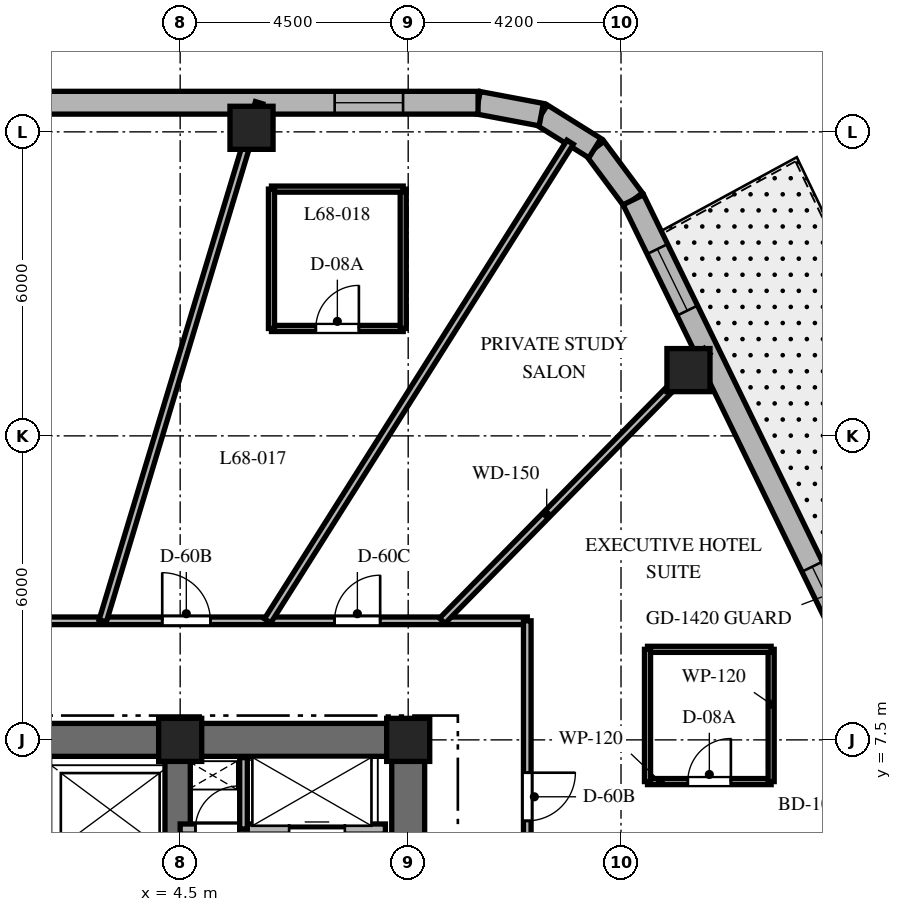
"""IFC4 building model, lengths in metres.
Left out: names, types, materials, properties, quantities, classifications, styles, units other than length and angle.
Written with IfcOpenShell. Run it as: python <this file> out.ifc"""

import sys

from ifc_helpers import new_model, si_unit, direction, frame, frame_2d, origin, origin_2d, place, context, subcontext, project, spatial, rectangle, extrude, element, fill, save


model = new_model("IFC4")
c1 = context("Model", 3, precision=1e-05, world=origin(), true_north=direction((0.0, 1.0)))
c2 = subcontext(c1, "Body", "Model", "MODEL_VIEW")
j1 = project(units=[si_unit("LENGTHUNIT", "METRE"), si_unit("PLANEANGLEUNIT", "RADIAN")], contexts=[c1])
p1 = place(None, origin())
s1 = spatial("IfcSite", under=j1, at=p1, CompositionType="ELEMENT")
p2 = place(p1, origin())
s2 = spatial("IfcBuilding", under=s1, at=p2, CompositionType="ELEMENT")
p3 = place(p2, frame((0.0, 0.0, 273.0)))
s3 = spatial("IfcBuildingStorey", under=s2, at=p3, CompositionType="ELEMENT", Elevation=273.0)
p4 = place(p3, frame((1.85, 7.5, 0.0), z_axis=(0.0, 0.0, 1.0), x_axis=(1.0, 0.0, 0.0)))
e1 = element("IfcWall", 1, at=p4, inside=s3, PredefinedType="SHEAR", context=c2, shape_type="SweptSolid", body=[
    extrude(rectangle(XDim=7.475, YDim=0.65, at=frame_2d((3.737, 0.0))), origin(), (0.0, 0.0, 1.0), 3.9),
])
p5 = place(p3, frame((9.0, -7.175, 0.0), z_axis=(0.0, 0.0, 1.0), x_axis=(0.0, 1.0, 0.0)))
e2 = element("IfcWall", 2, at=p5, inside=s3, PredefinedType="SHEAR", context=c2, shape_type="SweptSolid", body=[
    extrude(rectangle(XDim=14.35, YDim=0.65, at=frame_2d((7.175, 0.0))), origin(), (0.0, 0.0, 1.0), 3.9),
])
p6 = place(p5, frame((10.3, 0.0, 0.0)))
e3 = element("IfcOpeningElement", 3, at=p6, cuts=e2, PredefinedType="OPENING", context=c2, shape_type="SweptSolid", body=[
    extrude(rectangle(XDim=1.05, YDim=2.15, at=frame_2d((0.525, 1.075))), frame((0.0, 0.335, 0.0), z_axis=(0.0, -1.0, 0.0), x_axis=(1.0, 0.0, 0.0)), (0.0, 0.0, 1.0), 0.67),
])
p7 = place(p3, frame((4.45, 2.25, 0.0), z_axis=(0.0, 0.0, 1.0), x_axis=(0.0, 1.0, 0.0)))
e4 = element("IfcWall", 4, at=p7, inside=s3, PredefinedType="SHEAR", context=c2, shape_type="SweptSolid", body=[
    extrude(rectangle(XDim=4.925, YDim=0.5, at=frame_2d((2.462, 0.0))), origin(), (0.0, 0.0, 1.0), 3.9),
])
for number, where, z_axis, x_axis in (
    (5, (9.0, 7.5, 0.0), (0.0, 0.0, 1.0), (1.0, 0.0, 0.0)),
    (6, (4.5, 7.5, 0.0), (0.0, 0.0, 1.0), (1.0, 0.0, 0.0)),
    (7, (14.531, 14.798, 0.0), (0.0, 0.0, 1.0), (1.0, 0.0, 0.0)),
    (8, (5.908, 19.58, 0.0), (0.0, 0.0, 1.0), (1.0, 0.0, 0.0)),
):
    element("IfcColumn", number, at=place(p3, frame(where, z_axis=z_axis, x_axis=x_axis)), inside=s3, PredefinedType="COLUMN", context=c2, shape_type="SweptSolid", body=[
        extrude(rectangle(XDim=0.85, YDim=0.85, at=origin_2d()), origin(), (0.0, 0.0, 1.0), 3.9),
    ])
p8 = place(p3, frame((13.443, 18.16, 0.0), z_axis=(0.0, 0.0, 1.0), x_axis=(-0.597042425808, 0.802209661987, 0.0)))
e9 = element("IfcWall", 9, at=p8, inside=s3, PredefinedType="SOLIDWALL", context=c2, shape_type="SweptSolid", body=[
    extrude(rectangle(XDim=1.27, YDim=0.45, at=frame_2d((0.635, 0.0))), origin(), (0.0, 0.0, 1.0), 3.6),
])
p9 = place(p3, frame((12.685, 19.178, 0.0), z_axis=(0.0, 0.0, 1.0), x_axis=(-0.848031272749, 0.529946186362, 0.0)))
e10 = element("IfcWall", 10, at=p9, inside=s3, PredefinedType="SOLIDWALL", context=c2, shape_type="SweptSolid", body=[
    extrude(rectangle(XDim=1.248, YDim=0.45, at=frame_2d((0.624, 0.0))), origin(), (0.0, 0.0, 1.0), 3.6),
])
p10 = place(p3, frame((11.626, 19.84, 0.0), z_axis=(0.0, 0.0, 1.0), x_axis=(-0.982701956681, 0.185194126083, 0.0)))
e11 = element("IfcWall", 11, at=p10, inside=s3, PredefinedType="SOLIDWALL", context=c2, shape_type="SweptSolid", body=[
    extrude(rectangle(XDim=1.27, YDim=0.45, at=frame_2d((0.635, 0.0))), origin(), (0.0, 0.0, 1.0), 3.6),
])
p11 = place(p3, frame((21.138, 2.371, 0.0), z_axis=(0.0, 0.0, 1.0), x_axis=(-0.438128124058, 0.89891253574, 0.0)))
e12 = element("IfcWall", 12, at=p11, inside=s3, PredefinedType="SOLIDWALL", context=c2, shape_type="SweptSolid", body=[
    extrude(rectangle(XDim=17.565, YDim=0.45, at=frame_2d((8.782, 0.0))), origin(), (0.0, 0.0, 1.0), 3.6),
])
p12 = place(p11, frame((4.769, 0.0, 0.0)))
e13 = element("IfcOpeningElement", 13, at=p12, cuts=e12, PredefinedType="OPENING", context=c2, shape_type="SweptSolid", body=[
    extrude(rectangle(XDim=1.0, YDim=2.15, at=frame_2d((0.5, 1.075))), frame((0.0, 0.235, 0.0), z_axis=(0.0, -1.0, 0.0), x_axis=(1.0, 0.0, 0.0)), (0.0, 0.0, 1.0), 0.47),
])
p13 = place(p11, frame((8.158, 0.0, 0.8)))
e14 = element("IfcOpeningElement", 14, at=p13, cuts=e12, PredefinedType="OPENING", context=c2, shape_type="SweptSolid", body=[
    extrude(rectangle(XDim=1.35, YDim=1.75, at=frame_2d((0.675, 0.875))), frame((0.0, 0.235, 0.0), z_axis=(0.0, -1.0, 0.0), x_axis=(1.0, 0.0, 0.0)), (0.0, 0.0, 1.0), 0.47),
])
p14 = place(p11, frame((15.132, 0.0, 0.8)))
e15 = element("IfcOpeningElement", 15, at=p14, cuts=e12, PredefinedType="OPENING", context=c2, shape_type="SweptSolid", body=[
    extrude(rectangle(XDim=1.35, YDim=1.75, at=frame_2d((0.675, 0.875))), frame((0.0, 0.235, 0.0), z_axis=(0.0, -1.0, 0.0), x_axis=(1.0, 0.0, 0.0)), (0.0, 0.0, 1.0), 0.47),
])
p15 = place(p11, frame((1.133, 0.0, 0.8)))
e16 = element("IfcOpeningElement", 16, at=p15, cuts=e12, PredefinedType="OPENING", context=c2, shape_type="SweptSolid", body=[
    extrude(rectangle(XDim=1.35, YDim=1.75, at=frame_2d((0.675, 0.875))), frame((0.0, 0.235, 0.0), z_axis=(0.0, -1.0, 0.0), x_axis=(1.0, 0.0, 0.0)), (0.0, 0.0, 1.0), 0.47),
])
p16 = place(p3, frame((10.379, 20.075, 0.0), z_axis=(0.0, 0.0, 1.0), x_axis=(-1.0, 0.0, 0.0)))
e17 = element("IfcWall", 17, at=p16, inside=s3, PredefinedType="SOLIDWALL", context=c2, shape_type="SweptSolid", body=[
    extrude(rectangle(XDim=22.417, YDim=0.45, at=frame_2d((11.208, 0.0))), origin(), (0.0, 0.0, 1.0), 3.6),
])
p17 = place(p16, frame((1.48, 0.0, 0.8)))
e18 = element("IfcOpeningElement", 18, at=p17, cuts=e17, PredefinedType="OPENING", context=c2, shape_type="SweptSolid", body=[
    extrude(rectangle(XDim=1.35, YDim=1.75, at=frame_2d((0.675, 0.875))), frame((0.0, 0.235, 0.0), z_axis=(0.0, -1.0, 0.0), x_axis=(1.0, 0.0, 0.0)), (0.0, 0.0, 1.0), 0.47),
])
p18 = place(p16, frame((10.534, 0.0, 0.8)))
e19 = element("IfcOpeningElement", 19, at=p18, cuts=e17, PredefinedType="OPENING", context=c2, shape_type="SweptSolid", body=[
    extrude(rectangle(XDim=1.35, YDim=1.75, at=frame_2d((0.675, 0.875))), frame((0.0, 0.235, 0.0), z_axis=(0.0, -1.0, 0.0), x_axis=(1.0, 0.0, 0.0)), (0.0, 0.0, 1.0), 0.47),
])
p19 = place(p16, frame((19.587, 0.0, 0.8)))
e20 = element("IfcOpeningElement", 20, at=p19, cuts=e17, PredefinedType="OPENING", context=c2, shape_type="SweptSolid", body=[
    extrude(rectangle(XDim=1.35, YDim=1.75, at=frame_2d((0.675, 0.875))), frame((0.0, 0.235, 0.0), z_axis=(0.0, -1.0, 0.0), x_axis=(1.0, 0.0, 0.0)), (0.0, 0.0, 1.0), 0.47),
])
p20 = place(p3, frame((4.5, 5.74, 0.0), z_axis=(0.0, 0.0, 1.0), x_axis=(1.0, 0.0, 0.0)))
e21 = element("IfcWall", 21, at=p20, inside=s3, PredefinedType="PARTITIONING", context=c2, shape_type="SweptSolid", body=[
    extrude(rectangle(XDim=4.05, YDim=0.2, at=frame_2d((2.025, 0.0))), origin(), (0.0, 0.0, 1.0), 3.6),
])
p21 = place(p20, frame((0.3, 0.0, 0.0)))
e22 = element("IfcOpeningElement", 22, at=p21, cuts=e21, PredefinedType="OPENING", context=c2, shape_type="SweptSolid", body=[
    extrude(rectangle(XDim=0.85, YDim=2.03, at=frame_2d((0.425, 1.015))), frame((0.0, 0.11, 0.0), z_axis=(0.0, -1.0, 0.0), x_axis=(1.0, 0.0, 0.0)), (0.0, 0.0, 1.0), 0.22),
])
p22 = place(p20, frame((2.15, 0.0, 0.0)))
e23 = element("IfcOpeningElement", 23, at=p22, cuts=e21, PredefinedType="OPENING", context=c2, shape_type="SweptSolid", body=[
    extrude(rectangle(XDim=1.1, YDim=2.2, at=frame_2d((0.55, 1.1))), frame((0.0, 0.11, 0.0), z_axis=(0.0, -1.0, 0.0), x_axis=(1.0, 0.0, 0.0)), (0.0, 0.0, 1.0), 0.22),
])
p23 = place(p3, frame((5.75, 5.74, 0.0), z_axis=(0.0, 0.0, 1.0), x_axis=(0.0, 1.0, 0.0)))
e24 = element("IfcWall", 24, at=p23, inside=s3, PredefinedType="PARTITIONING", context=c2, shape_type="SweptSolid", body=[
    extrude(rectangle(XDim=1.41, YDim=0.15, at=frame_2d((0.705, 0.0))), origin(), (0.0, 0.0, 1.0), 3.6),
])
p24 = place(p3, frame((0.92, 9.85, 0.0), z_axis=(0.0, 0.0, 1.0), x_axis=(1.0, 0.0, 0.0)))
e25 = element("IfcWall", 25, at=p24, inside=s3, PredefinedType="PARTITIONING", context=c2, shape_type="SweptSolid", body=[
    extrude(rectangle(XDim=10.43, YDim=0.15, at=frame_2d((5.215, 0.0))), origin(), (0.0, 0.0, 1.0), 3.09),
])
p25 = place(p24, frame((6.627, 0.0, 0.0)))
e26 = element("IfcOpeningElement", 26, at=p25, cuts=e25, PredefinedType="OPENING", context=c2, shape_type="SweptSolid", body=[
    extrude(rectangle(XDim=0.9, YDim=2.03, at=frame_2d((0.45, 1.015))), frame((0.0, 0.085, 0.0), z_axis=(0.0, -1.0, 0.0), x_axis=(1.0, 0.0, 0.0)), (0.0, 0.0, 1.0), 0.17),
])
p26 = place(p24, frame((3.226, 0.0, 0.0)))
e27 = element("IfcOpeningElement", 27, at=p26, cuts=e25, PredefinedType="OPENING", context=c2, shape_type="SweptSolid", body=[
    extrude(rectangle(XDim=0.95, YDim=2.03, at=frame_2d((0.475, 1.015))), frame((0.0, 0.085, 0.0), z_axis=(0.0, -1.0, 0.0), x_axis=(1.0, 0.0, 0.0)), (0.0, 0.0, 1.0), 0.17),
])
p27 = place(p3, frame((11.35, 9.85, 0.0), z_axis=(0.0, 0.0, 1.0), x_axis=(0.0, -1.0, 0.0)))
e28 = element("IfcWall", 28, at=p27, inside=s3, PredefinedType="PARTITIONING", context=c2, shape_type="SweptSolid", body=[
    extrude(rectangle(XDim=12.4, YDim=0.15, at=frame_2d((6.2, 0.0))), origin(), (0.0, 0.0, 1.0), 3.09),
])
p28 = place(p27, frame((2.998, 0.0, 0.0)))
e29 = element("IfcOpeningElement", 29, at=p28, cuts=e28, PredefinedType="OPENING", context=c2, shape_type="SweptSolid", body=[
    extrude(rectangle(XDim=0.95, YDim=2.03, at=frame_2d((0.475, 1.015))), frame((0.0, 0.085, 0.0), z_axis=(0.0, -1.0, 0.0), x_axis=(1.0, 0.0, 0.0)), (0.0, 0.0, 1.0), 0.17),
])
p29 = place(p27, frame((8.835, 0.0, 0.0)))
e30 = element("IfcOpeningElement", 30, at=p29, cuts=e28, PredefinedType="OPENING", context=c2, shape_type="SweptSolid", body=[
    extrude(rectangle(XDim=0.95, YDim=2.03, at=frame_2d((0.475, 1.015))), frame((0.0, 0.085, 0.0), z_axis=(0.0, -1.0, 0.0), x_axis=(1.0, 0.0, 0.0)), (0.0, 0.0, 1.0), 0.17),
])
p30 = place(p3, frame((9.672, 9.85, 0.0), z_axis=(0.0, 0.0, 1.0), x_axis=(0.700629771301, 0.713524998558, 0.0)))
e31 = element("IfcWall", 31, at=p30, inside=s3, PredefinedType="PARTITIONING", context=c2, shape_type="SweptSolid", body=[
    extrude(rectangle(XDim=7.459, YDim=0.15, at=frame_2d((3.73, 0.0))), origin(), (0.0, 0.0, 1.0), 2.94),
])
p31 = place(p3, frame((6.226, 9.85, 0.0), z_axis=(0.0, 0.0, 1.0), x_axis=(0.53429711317, 0.845296749584, 0.0)))
e32 = element("IfcWall", 32, at=p31, inside=s3, PredefinedType="PARTITIONING", context=c2, shape_type="SweptSolid", body=[
    extrude(rectangle(XDim=11.174, YDim=0.15, at=frame_2d((5.587, 0.0))), origin(), (0.0, 0.0, 1.0), 2.94),
])
p32 = place(p3, frame((2.972, 9.85, 0.0), z_axis=(0.0, 0.0, 1.0), x_axis=(0.288872169679, 0.957367677324, 0.0)))
e33 = element("IfcWall", 33, at=p32, inside=s3, PredefinedType="PARTITIONING", context=c2, shape_type="SweptSolid", body=[
    extrude(rectangle(XDim=10.68, YDim=0.15, at=frame_2d((5.34, 0.0))), origin(), (0.0, 0.0, 1.0), 2.94),
])
p33 = place(p3, frame((13.723, 6.677, 0.0), z_axis=(0.0, 0.0, 1.0), x_axis=(1.0, 0.0, 0.0)))
e34 = element("IfcWall", 34, at=p33, inside=s3, PredefinedType="PARTITIONING", context=c2, shape_type="SweptSolid", body=[
    extrude(rectangle(XDim=2.44, YDim=0.12, at=frame_2d((1.22, 0.0))), origin(), (0.0, 0.0, 1.0), 3.126),
])
p34 = place(p33, frame((0.795, 0.0, 0.0)))
e35 = element("IfcOpeningElement", 35, at=p34, cuts=e34, PredefinedType="OPENING", context=c2, shape_type="SweptSolid", body=[
    extrude(rectangle(XDim=0.85, YDim=2.03, at=frame_2d((0.425, 1.015))), frame((0.0, 0.07, 0.0), z_axis=(0.0, -1.0, 0.0), x_axis=(1.0, 0.0, 0.0)), (0.0, 0.0, 1.0), 0.14),
])
p35 = place(p3, frame((16.163, 6.677, 0.0), z_axis=(0.0, 0.0, 1.0), x_axis=(0.0, 1.0, 0.0)))
e36 = element("IfcWall", 36, at=p35, inside=s3, PredefinedType="PARTITIONING", context=c2, shape_type="SweptSolid", body=[
    extrude(rectangle(XDim=2.61, YDim=0.12, at=frame_2d((1.305, 0.0))), origin(), (0.0, 0.0, 1.0), 3.6),
])
p36 = place(p3, frame((16.163, 9.287, 0.0), z_axis=(0.0, 0.0, 1.0), x_axis=(-1.0, 0.0, 0.0)))
e37 = element("IfcWall", 37, at=p36, inside=s3, PredefinedType="PARTITIONING", context=c2, shape_type="SweptSolid", body=[
    extrude(rectangle(XDim=2.44, YDim=0.12, at=frame_2d((1.22, 0.0))), origin(), (0.0, 0.0, 1.0), 3.126),
])
p37 = place(p3, frame((13.723, 9.287, 0.0), z_axis=(0.0, 0.0, 1.0), x_axis=(0.0, -1.0, 0.0)))
e38 = element("IfcWall", 38, at=p37, inside=s3, PredefinedType="PARTITIONING", context=c2, shape_type="SweptSolid", body=[
    extrude(rectangle(XDim=2.61, YDim=0.12, at=frame_2d((1.305, 0.0))), origin(), (0.0, 0.0, 1.0), 3.6),
])
p38 = place(p3, frame((6.302, 15.62, 0.0), z_axis=(0.0, 0.0, 1.0), x_axis=(1.0, 0.0, 0.0)))
e39 = element("IfcWall", 39, at=p38, inside=s3, PredefinedType="PARTITIONING", context=c2, shape_type="SweptSolid", body=[
    extrude(rectangle(XDim=2.6, YDim=0.12, at=frame_2d((1.3, 0.0))), origin(), (0.0, 0.0, 1.0), 3.6),
])
p39 = place(p38, frame((0.875, 0.0, 0.0)))
e40 = element("IfcOpeningElement", 40, at=p39, cuts=e39, PredefinedType="OPENING", context=c2, shape_type="SweptSolid", body=[
    extrude(rectangle(XDim=0.85, YDim=2.03, at=frame_2d((0.425, 1.015))), frame((0.0, 0.07, 0.0), z_axis=(0.0, -1.0, 0.0), x_axis=(1.0, 0.0, 0.0)), (0.0, 0.0, 1.0), 0.14),
])
p40 = place(p3, frame((8.902, 15.62, 0.0), z_axis=(0.0, 0.0, 1.0), x_axis=(0.0, 1.0, 0.0)))
e41 = element("IfcWall", 41, at=p40, inside=s3, PredefinedType="PARTITIONING", context=c2, shape_type="SweptSolid", body=[
    extrude(rectangle(XDim=2.75, YDim=0.12, at=frame_2d((1.375, 0.0))), origin(), (0.0, 0.0, 1.0), 2.94),
])
p41 = place(p3, frame((8.902, 18.37, 0.0), z_axis=(0.0, 0.0, 1.0), x_axis=(-1.0, 0.0, 0.0)))
e42 = element("IfcWall", 42, at=p41, inside=s3, PredefinedType="PARTITIONING", context=c2, shape_type="SweptSolid", body=[
    extrude(rectangle(XDim=2.6, YDim=0.12, at=frame_2d((1.3, 0.0))), origin(), (0.0, 0.0, 1.0), 2.94),
])
p42 = place(p3, frame((6.302, 18.37, 0.0), z_axis=(0.0, 0.0, 1.0), x_axis=(0.0, -1.0, 0.0)))
e43 = element("IfcWall", 43, at=p42, inside=s3, PredefinedType="PARTITIONING", context=c2, shape_type="SweptSolid", body=[
    extrude(rectangle(XDim=2.75, YDim=0.12, at=frame_2d((1.375, 0.0))), origin(), (0.0, 0.0, 1.0), 3.6),
])
p43 = place(p13, origin())
e44 = element("IfcWindow", 44, at=p43, inside=s3, PartitioningType="SINGLE_PANEL", PredefinedType="WINDOW", context=c2, shape_type="SweptSolid", body=[
    extrude(rectangle(XDim=1.35, YDim=1.75, at=frame_2d((0.675, 0.875))), frame((0.0, 0.03, 0.0), z_axis=(0.0, -1.0, 0.0), x_axis=(1.0, 0.0, 0.0)), (0.0, 0.0, 1.0), 0.06),
])
fill(e14, e44)
p44 = place(p14, origin())
e45 = element("IfcWindow", 45, at=p44, inside=s3, PartitioningType="SINGLE_PANEL", PredefinedType="WINDOW", context=c2, shape_type="SweptSolid", body=[
    extrude(rectangle(XDim=1.35, YDim=1.75, at=frame_2d((0.675, 0.875))), frame((0.0, 0.03, 0.0), z_axis=(0.0, -1.0, 0.0), x_axis=(1.0, 0.0, 0.0)), (0.0, 0.0, 1.0), 0.06),
])
fill(e15, e45)
p45 = place(p17, origin())
e46 = element("IfcWindow", 46, at=p45, inside=s3, PartitioningType="SINGLE_PANEL", PredefinedType="WINDOW", context=c2, shape_type="SweptSolid", body=[
    extrude(rectangle(XDim=1.35, YDim=1.75, at=frame_2d((0.675, 0.875))), frame((0.0, 0.03, 0.0), z_axis=(0.0, -1.0, 0.0), x_axis=(1.0, 0.0, 0.0)), (0.0, 0.0, 1.0), 0.06),
])
fill(e18, e46)
p46 = place(p21, origin())
e47 = element("IfcDoor", 47, at=p46, inside=s3, OperationType="SINGLE_SWING_RIGHT", PredefinedType="DOOR", context=c2, shape_type="SweptSolid", body=[
    extrude(rectangle(XDim=0.85, YDim=2.03, at=frame_2d((0.425, 1.015))), frame((0.0, 0.025, 0.0), z_axis=(0.0, -1.0, 0.0), x_axis=(1.0, 0.0, 0.0)), (0.0, 0.0, 1.0), 0.05),
])
fill(e22, e47)
p47 = place(p22, origin())
e48 = element("IfcDoor", 48, at=p47, inside=s3, OperationType="SLIDING_TO_RIGHT", PredefinedType="DOOR", context=c2, shape_type="SweptSolid", body=[
    extrude(rectangle(XDim=1.1, YDim=2.2, at=frame_2d((0.55, 1.1))), frame((0.0, 0.025, 0.0), z_axis=(0.0, -1.0, 0.0), x_axis=(1.0, 0.0, 0.0)), (0.0, 0.0, 1.0), 0.05),
])
fill(e23, e48)
p48 = place(p28, origin())
e49 = element("IfcDoor", 49, at=p48, inside=s3, OperationType="SINGLE_SWING_LEFT", PredefinedType="DOOR", context=c2, shape_type="SweptSolid", body=[
    extrude(rectangle(XDim=0.95, YDim=2.03, at=frame_2d((0.475, 1.015))), frame((0.0, 0.025, 0.0), z_axis=(0.0, -1.0, 0.0), x_axis=(1.0, 0.0, 0.0)), (0.0, 0.0, 1.0), 0.05),
])
fill(e29, e49)
p49 = place(p34, origin())
e50 = element("IfcDoor", 50, at=p49, inside=s3, OperationType="SINGLE_SWING_RIGHT", PredefinedType="DOOR", context=c2, shape_type="SweptSolid", body=[
    extrude(rectangle(XDim=0.85, YDim=2.03, at=frame_2d((0.425, 1.015))), frame((0.0, 0.025, 0.0), z_axis=(0.0, -1.0, 0.0), x_axis=(1.0, 0.0, 0.0)), (0.0, 0.0, 1.0), 0.05),
])
fill(e35, e50)
p50 = place(p25, origin())
e51 = element("IfcDoor", 51, at=p50, inside=s3, OperationType="SINGLE_SWING_RIGHT", PredefinedType="DOOR", context=c2, shape_type="SweptSolid", body=[
    extrude(rectangle(XDim=0.9, YDim=2.03, at=frame_2d((0.45, 1.015))), frame((0.0, 0.025, 0.0), z_axis=(0.0, -1.0, 0.0), x_axis=(1.0, 0.0, 0.0)), (0.0, 0.0, 1.0), 0.05),
])
fill(e26, e51)
p51 = place(p26, origin())
e52 = element("IfcDoor", 52, at=p51, inside=s3, OperationType="SINGLE_SWING_LEFT", PredefinedType="DOOR", context=c2, shape_type="SweptSolid", body=[
    extrude(rectangle(XDim=0.95, YDim=2.03, at=frame_2d((0.475, 1.015))), frame((0.0, 0.025, 0.0), z_axis=(0.0, -1.0, 0.0), x_axis=(1.0, 0.0, 0.0)), (0.0, 0.0, 1.0), 0.05),
])
fill(e27, e52)
p52 = place(p39, origin())
e53 = element("IfcDoor", 53, at=p52, inside=s3, OperationType="SINGLE_SWING_RIGHT", PredefinedType="DOOR", context=c2, shape_type="SweptSolid", body=[
    extrude(rectangle(XDim=0.85, YDim=2.03, at=frame_2d((0.425, 1.015))), frame((0.0, 0.025, 0.0), z_axis=(0.0, -1.0, 0.0), x_axis=(1.0, 0.0, 0.0)), (0.0, 0.0, 1.0), 0.05),
])
fill(e40, e53)
save(model, sys.argv[1])
